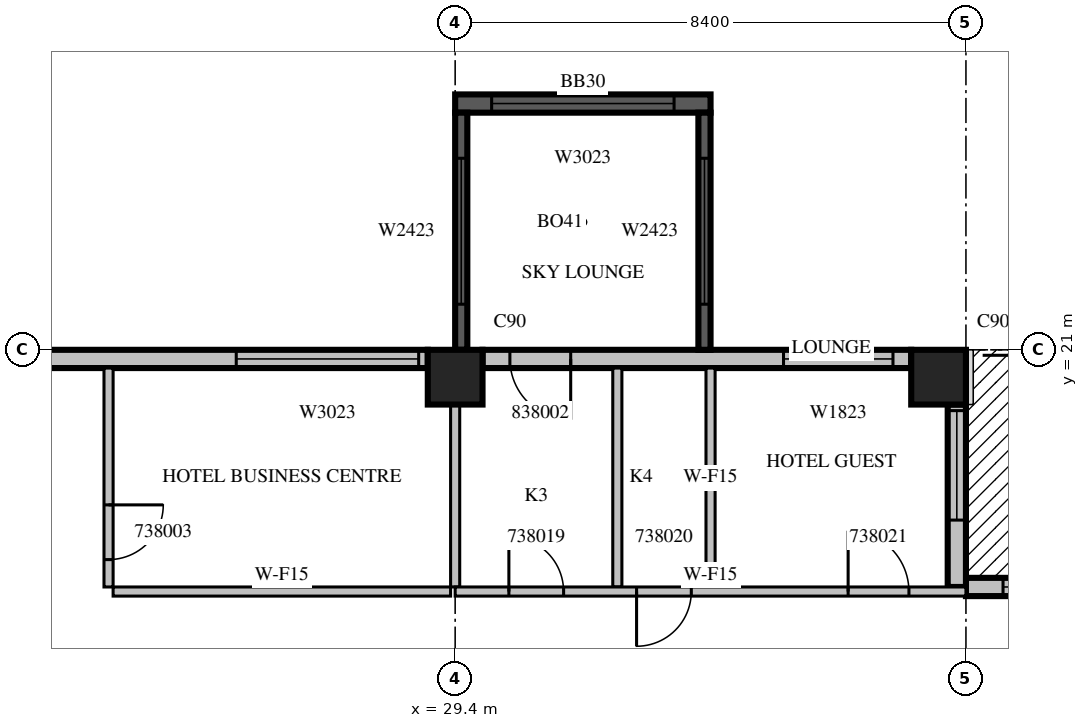
"""IFC4 building model, lengths in metres.
Left out: names, types, materials, properties, quantities, classifications, styles, units other than length and angle.
Written with IfcOpenShell. Run it as: python <this file> out.ifc"""

import sys

from ifc_helpers import new_model, si_unit, direction, frame, frame_2d, origin, origin_2d, place, context, subcontext, project, spatial, rectangle, extrude, source, transform, mapped, element, fill, save


model = new_model("IFC4")
c1 = context("Model", 3, precision=1e-05, world=origin(), true_north=direction((0.0, 1.0)))
c2 = subcontext(c1, "Body", "Model", "MODEL_VIEW")
j1 = project(units=[si_unit("LENGTHUNIT", "METRE"), si_unit("PLANEANGLEUNIT", "RADIAN")], contexts=[c1])
p1 = place(None, origin())
s1 = spatial("IfcSite", under=j1, at=p1, CompositionType="ELEMENT")
p2 = place(p1, origin())
s2 = spatial("IfcBuilding", under=s1, at=p2, CompositionType="ELEMENT")
p3 = place(p2, frame((0.0, 0.0, 177.8)))
s3 = spatial("IfcBuildingStorey", under=s2, at=p3, CompositionType="ELEMENT", Elevation=177.8)
m1 = source(origin(), c2, "Body", "SweptSolid", [
    extrude(rectangle(XDim=0.9, YDim=0.9, at=origin_2d()), origin(), (0.0, 0.0, 1.0), 3.8),
])
for number, where, z_axis, x_axis in (
    (1, (29.4, 20.55, 0.0), (0.0, 0.0, 1.0), (1.0, 0.0, 0.0)),
    (2, (37.35, 20.55, 0.0), (0.0, 0.0, 1.0), (1.0, 0.0, 0.0)),
):
    element("IfcColumn", number, at=place(p3, frame(where, z_axis=z_axis, x_axis=x_axis)), inside=s3, PredefinedType="COLUMN", context=c2, shape_type="MappedRepresentation", body=[
        mapped(m1, transform((0.0, 0.0, 0.0), scale=1.0)),
    ])
p4 = place(p3, frame((59.64, 17.1, 0.0), z_axis=(0.0, 0.0, 1.0), x_axis=(-1.0, 0.0, 0.0)))
e3 = element("IfcWall", 3, at=p4, inside=s3, PredefinedType="STANDARD", context=c2, shape_type="SweptSolid", body=[
    extrude(rectangle(XDim=21.84, YDim=0.3, at=frame_2d((10.92, 0.0))), origin(), (0.0, 0.0, 1.0), 3.4),
])
m2 = source(origin(), c2, "Body", "SweptSolid", [
    extrude(rectangle(XDim=1.8, YDim=2.4, at=frame_2d((0.9, 1.2))), frame((0.0, 0.16, 0.0), z_axis=(0.0, -1.0, 0.0), x_axis=(1.0, 0.0, 0.0)), (0.0, 0.0, 1.0), 0.32),
])
p5 = place(p4, frame((1.2, 0.0, 0.0)))
e4 = element("IfcOpeningElement", 4, at=p5, cuts=e3, PredefinedType="OPENING", context=c2, shape_type="MappedRepresentation", body=[
    mapped(m2, transform((0.0, 0.0, 0.0), scale=1.0)),
])
p6 = place(p4, frame((5.4, 0.0, 0.0)))
e5 = element("IfcOpeningElement", 5, at=p6, cuts=e3, PredefinedType="OPENING", context=c2, shape_type="MappedRepresentation", body=[
    mapped(m2, transform((0.0, 0.0, 0.0), scale=1.0)),
])
p7 = place(p4, frame((10.44, 0.0, 0.0)))
e6 = element("IfcOpeningElement", 6, at=p7, cuts=e3, PredefinedType="OPENING", context=c2, shape_type="MappedRepresentation", body=[
    mapped(m2, transform((0.0, 0.0, 0.0), scale=1.0)),
])
p8 = place(p4, frame((16.32, 0.0, 0.0)))
e7 = element("IfcOpeningElement", 7, at=p8, cuts=e3, PredefinedType="OPENING", context=c2, shape_type="MappedRepresentation", body=[
    mapped(m2, transform((0.0, 0.0, 0.0), scale=1.0)),
])
m3 = source(origin(), c2, "Body", "SweptSolid", [
    extrude(rectangle(XDim=1.8, YDim=2.3, at=frame_2d((0.9, 1.15))), frame((0.0, 0.16, 0.0), z_axis=(0.0, -1.0, 0.0), x_axis=(1.0, 0.0, 0.0)), (0.0, 0.0, 1.0), 0.32),
])
p9 = place(p4, frame((7.92, 0.0, 0.6)))
e8 = element("IfcOpeningElement", 8, at=p9, cuts=e3, PredefinedType="OPENING", context=c2, shape_type="MappedRepresentation", body=[
    mapped(m3, transform((0.0, 0.0, 0.0), scale=1.0)),
])
p10 = place(p4, frame((13.08, 0.0, 0.6)))
e9 = element("IfcOpeningElement", 9, at=p10, cuts=e3, PredefinedType="OPENING", context=c2, shape_type="SweptSolid", body=[
    extrude(rectangle(XDim=2.4, YDim=2.3, at=frame_2d((1.2, 1.15))), frame((0.0, 0.16, 0.0), z_axis=(0.0, -1.0, 0.0), x_axis=(1.0, 0.0, 0.0)), (0.0, 0.0, 1.0), 0.32),
])
m4 = source(origin(), c2, "Body", "SweptSolid", [
    extrude(rectangle(XDim=2.4, YDim=2.3, at=frame_2d((1.2, 1.15))), frame((0.0, 0.16, 0.0), z_axis=(0.0, -1.0, 0.0), x_axis=(1.0, 0.0, 0.0)), (0.0, 0.0, 1.0), 0.32),
])
p11 = place(p4, frame((18.83, 0.0, 0.6)))
e10 = element("IfcOpeningElement", 10, at=p11, cuts=e3, PredefinedType="OPENING", context=c2, shape_type="MappedRepresentation", body=[
    mapped(m4, transform((0.0, 0.0, 0.0), scale=1.0)),
])
p12 = place(p3, frame((37.65, 17.1, 0.0), z_axis=(0.0, 0.0, 1.0), x_axis=(0.0, 1.0, 0.0)))
e11 = element("IfcWall", 11, at=p12, inside=s3, PredefinedType="STANDARD", context=c2, shape_type="SweptSolid", body=[
    extrude(rectangle(XDim=3.0, YDim=0.3, at=frame_2d((1.5, 0.0))), origin(), (0.0, 0.0, 1.0), 3.4),
])
p13 = place(p12, frame((1.1, 0.0, 0.0)))
e12 = element("IfcOpeningElement", 12, at=p13, cuts=e11, PredefinedType="OPENING", context=c2, shape_type="MappedRepresentation", body=[
    mapped(m2, transform((0.0, 0.0, 0.0), scale=1.0)),
])
p14 = place(p3, frame((36.9, 20.85, 0.0), z_axis=(0.0, 0.0, 1.0), x_axis=(-1.0, 0.0, 0.0)))
e13 = element("IfcWall", 13, at=p14, inside=s3, PredefinedType="STANDARD", context=c2, shape_type="SweptSolid", body=[
    extrude(rectangle(XDim=7.05, YDim=0.3, at=frame_2d((3.525, 0.0))), origin(), (0.0, 0.0, 1.0), 3.4),
])
p15 = place(p14, frame((0.3, 0.0, 0.6)))
e14 = element("IfcOpeningElement", 14, at=p15, cuts=e13, PredefinedType="OPENING", context=c2, shape_type="MappedRepresentation", body=[
    mapped(m3, transform((0.0, 0.0, 0.0), scale=1.0)),
])
m5 = source(origin(), c2, "Body", "SweptSolid", [
    extrude(rectangle(XDim=1.0, YDim=2.1, at=frame_2d((0.5, 1.05))), frame((0.0, 0.16, 0.0), z_axis=(0.0, -1.0, 0.0), x_axis=(1.0, 0.0, 0.0)), (0.0, 0.0, 1.0), 0.32),
])
p16 = place(p14, frame((5.6, 0.0, 0.0)))
e15 = element("IfcOpeningElement", 15, at=p16, cuts=e13, PredefinedType="OPENING", context=c2, shape_type="MappedRepresentation", body=[
    mapped(m5, transform((0.0, 0.0, 0.0), scale=1.0)),
])
p17 = place(p3, frame((28.95, 20.85, 0.0), z_axis=(0.0, 0.0, 1.0), x_axis=(-1.0, 0.0, 0.0)))
e16 = element("IfcWall", 16, at=p17, inside=s3, PredefinedType="STANDARD", context=c2, shape_type="SweptSolid", body=[
    extrude(rectangle(XDim=7.15, YDim=0.3, at=frame_2d((3.575, 0.0))), origin(), (0.0, 0.0, 1.0), 3.4),
])
m6 = source(origin(), c2, "Body", "SweptSolid", [
    extrude(rectangle(XDim=3.0, YDim=2.3, at=frame_2d((1.5, 1.15))), frame((0.0, 0.16, 0.0), z_axis=(0.0, -1.0, 0.0), x_axis=(1.0, 0.0, 0.0)), (0.0, 0.0, 1.0), 0.32),
])
p18 = place(p17, frame((0.15, 0.0, 0.6)))
e17 = element("IfcOpeningElement", 17, at=p18, cuts=e16, PredefinedType="OPENING", context=c2, shape_type="MappedRepresentation", body=[
    mapped(m6, transform((0.0, 0.0, 0.0), scale=1.0)),
])
p19 = place(p3, frame((33.6, 25.05, 0.0), z_axis=(0.0, 0.0, 1.0), x_axis=(-1.0, 0.0, 0.0)))
e18 = element("IfcWall", 18, at=p19, inside=s3, PredefinedType="SOLIDWALL", context=c2, shape_type="SweptSolid", body=[
    extrude(rectangle(XDim=4.2, YDim=0.3, at=frame_2d((2.1, 0.0))), origin(), (0.0, 0.0, 1.0), 3.39),
])
p20 = place(p19, frame((0.6, 0.0, 0.6)))
e19 = element("IfcOpeningElement", 19, at=p20, cuts=e18, PredefinedType="OPENING", context=c2, shape_type="MappedRepresentation", body=[
    mapped(m6, transform((0.0, 0.0, 0.0), scale=1.0)),
])
m7 = source(origin(), c2, "Body", "SweptSolid", [
    extrude(rectangle(XDim=3.9, YDim=0.2, at=frame_2d((1.95, 0.0))), origin(), (0.0, 0.0, 1.0), 3.39),
])
p21 = place(p3, frame((33.5, 21.0, 0.0), z_axis=(0.0, 0.0, 1.0), x_axis=(0.0, 1.0, 0.0)))
e20 = element("IfcWall", 20, at=p21, inside=s3, PredefinedType="SOLIDWALL", context=c2, shape_type="MappedRepresentation", body=[
    mapped(m7, transform((0.0, 0.0, 0.0), scale=1.0)),
])
m8 = source(origin(), c2, "Body", "SweptSolid", [
    extrude(rectangle(XDim=2.4, YDim=2.3, at=frame_2d((1.2, 1.15))), frame((0.0, 0.11, 0.0), z_axis=(0.0, -1.0, 0.0), x_axis=(1.0, 0.0, 0.0)), (0.0, 0.0, 1.0), 0.22),
])
p22 = place(p21, frame((0.75, 0.0, 0.6)))
e21 = element("IfcOpeningElement", 21, at=p22, cuts=e20, PredefinedType="OPENING", context=c2, shape_type="MappedRepresentation", body=[
    mapped(m8, transform((0.0, 0.0, 0.0), scale=1.0)),
])
p23 = place(p3, frame((29.5, 21.0, 0.0), z_axis=(0.0, 0.0, 1.0), x_axis=(0.0, 1.0, 0.0)))
e22 = element("IfcWall", 22, at=p23, inside=s3, PredefinedType="SOLIDWALL", context=c2, shape_type="MappedRepresentation", body=[
    mapped(m7, transform((0.0, 0.0, 0.0), scale=1.0)),
])
p24 = place(p23, frame((0.75, 0.0, 0.6)))
e23 = element("IfcOpeningElement", 23, at=p24, cuts=e22, PredefinedType="OPENING", context=c2, shape_type="MappedRepresentation", body=[
    mapped(m8, transform((0.0, 0.0, 0.0), scale=1.0)),
])
p25 = place(p3, frame((23.7, 20.7, 0.0), z_axis=(0.0, 0.0, 1.0), x_axis=(0.0, -1.0, 0.0)))
e24 = element("IfcWall", 24, at=p25, inside=s3, PredefinedType="PARTITIONING", context=c2, shape_type="SweptSolid", body=[
    extrude(rectangle(XDim=3.6, YDim=0.15, at=frame_2d((1.8, 0.0))), origin(), (0.0, 0.0, 1.0), 3.4),
])
m9 = source(origin(), c2, "Body", "SweptSolid", [
    extrude(rectangle(XDim=0.9, YDim=2.1, at=frame_2d((0.45, 1.05))), frame((0.0, 0.085, 0.0), z_axis=(0.0, -1.0, 0.0), x_axis=(1.0, 0.0, 0.0)), (0.0, 0.0, 1.0), 0.17),
])
p26 = place(p25, frame((2.25, 0.0, 0.0)))
e25 = element("IfcOpeningElement", 25, at=p26, cuts=e24, PredefinedType="OPENING", context=c2, shape_type="MappedRepresentation", body=[
    mapped(m9, transform((0.0, 0.0, 0.0), scale=1.0)),
])
m10 = source(origin(), c2, "Body", "SweptSolid", [
    extrude(rectangle(XDim=5.55, YDim=0.15, at=frame_2d((2.775, 0.0))), origin(), (0.0, 0.0, 1.0), 3.4),
])
p27 = place(p3, frame((23.775, 17.025, 0.0), z_axis=(0.0, 0.0, 1.0), x_axis=(1.0, 0.0, 0.0)))
e26 = element("IfcWall", 26, at=p27, inside=s3, PredefinedType="PARTITIONING", context=c2, shape_type="MappedRepresentation", body=[
    mapped(m10, transform((0.0, 0.0, 0.0), scale=1.0)),
])
p28 = place(p3, frame((29.4, 17.1, 0.0), z_axis=(0.0, 0.0, 1.0), x_axis=(0.0, 1.0, 0.0)))
e27 = element("IfcWall", 27, at=p28, inside=s3, PredefinedType="PARTITIONING", context=c2, shape_type="SweptSolid", body=[
    extrude(rectangle(XDim=3.001, YDim=0.15, at=frame_2d((1.5, 0.0))), origin(), (0.0, 0.0, 1.0), 3.4),
])
m11 = source(origin(), c2, "Body", "SweptSolid", [
    extrude(rectangle(XDim=3.6, YDim=0.15, at=frame_2d((1.8, 0.0))), origin(), (0.0, 0.0, 1.0), 3.4),
])
for number, where, z_axis, x_axis in (
    (28, (32.067, 20.7, 0.0), (0.0, 0.0, 1.0), (0.0, -1.0, 0.0)),
    (29, (33.6, 17.1, 0.0), (0.0, 0.0, 1.0), (0.0, 1.0, 0.0)),
):
    element("IfcWall", number, at=place(p3, frame(where, z_axis=z_axis, x_axis=x_axis)), inside=s3, PredefinedType="PARTITIONING", context=c2, shape_type="MappedRepresentation", body=[
        mapped(m11, transform((0.0, 0.0, 0.0), scale=1.0)),
    ])
m12 = source(origin(), c2, "Body", "SweptSolid", [
    extrude(rectangle(XDim=8.4, YDim=0.15, at=frame_2d((4.2, 0.0))), origin(), (0.0, 0.0, 1.0), 3.4),
])
p29 = place(p3, frame((29.4, 17.025, 0.0), z_axis=(0.0, 0.0, 1.0), x_axis=(1.0, 0.0, 0.0)))
e30 = element("IfcWall", 30, at=p29, inside=s3, PredefinedType="PARTITIONING", context=c2, shape_type="MappedRepresentation", body=[
    mapped(m12, transform((0.0, 0.0, 0.0), scale=1.0)),
])
p30 = place(p29, frame((0.883, 0.0, 0.0)))
e31 = element("IfcOpeningElement", 31, at=p30, cuts=e30, PredefinedType="OPENING", context=c2, shape_type="MappedRepresentation", body=[
    mapped(m9, transform((0.0, 0.0, 0.0), scale=1.0)),
])
p31 = place(p29, frame((2.983, 0.0, 0.0)))
e32 = element("IfcOpeningElement", 32, at=p31, cuts=e30, PredefinedType="OPENING", context=c2, shape_type="MappedRepresentation", body=[
    mapped(m9, transform((0.0, 0.0, 0.0), scale=1.0)),
])
m13 = source(origin(), c2, "Body", "SweptSolid", [
    extrude(rectangle(XDim=1.0, YDim=2.1, at=frame_2d((0.5, 1.05))), frame((0.0, 0.085, 0.0), z_axis=(0.0, -1.0, 0.0), x_axis=(1.0, 0.0, 0.0)), (0.0, 0.0, 1.0), 0.17),
])
p32 = place(p29, frame((6.463, 0.0, 0.0)))
e33 = element("IfcOpeningElement", 33, at=p32, cuts=e30, PredefinedType="OPENING", context=c2, shape_type="MappedRepresentation", body=[
    mapped(m13, transform((0.0, 0.0, 0.0), scale=1.0)),
])
m14 = source(origin(), c2, "Body", "SweptSolid", [
    extrude(rectangle(XDim=2.4, YDim=2.3, at=frame_2d((1.2, 1.15))), frame((0.0, 0.03, 0.0), z_axis=(0.0, -1.0, 0.0), x_axis=(1.0, 0.0, 0.0)), (0.0, 0.0, 1.0), 0.06),
])
p33 = place(p11, origin())
e34 = element("IfcWindow", 34, at=p33, inside=s3, PartitioningType="SINGLE_PANEL", PredefinedType="WINDOW", context=c2, shape_type="MappedRepresentation", body=[
    mapped(m14, transform((0.0, 0.0, 0.0), scale=1.0)),
])
fill(e10, e34)
m15 = source(origin(), c2, "Body", "SweptSolid", [
    extrude(rectangle(XDim=1.8, YDim=2.4, at=frame_2d((0.9, 1.2))), frame((0.0, 0.025, 0.0), z_axis=(0.0, -1.0, 0.0), x_axis=(1.0, 0.0, 0.0)), (0.0, 0.0, 1.0), 0.05),
])
p34 = place(p13, origin())
e35 = element("IfcDoor", 35, at=p34, inside=s3, OperationType="SLIDING_TO_LEFT", PredefinedType="DOOR", context=c2, shape_type="MappedRepresentation", body=[
    mapped(m15, transform((0.0, 0.0, 0.0), scale=1.0)),
])
fill(e12, e35)
m16 = source(origin(), c2, "Body", "SweptSolid", [
    extrude(rectangle(XDim=1.8, YDim=2.3, at=frame_2d((0.9, 1.15))), frame((0.0, 0.03, 0.0), z_axis=(0.0, -1.0, 0.0), x_axis=(1.0, 0.0, 0.0)), (0.0, 0.0, 1.0), 0.06),
])
p35 = place(p15, origin())
e36 = element("IfcWindow", 36, at=p35, inside=s3, PartitioningType="SINGLE_PANEL", PredefinedType="WINDOW", context=c2, shape_type="MappedRepresentation", body=[
    mapped(m16, transform((0.0, 0.0, 0.0), scale=1.0)),
])
fill(e14, e36)
m17 = source(origin(), c2, "Body", "SweptSolid", [
    extrude(rectangle(XDim=3.0, YDim=2.3, at=frame_2d((1.5, 1.15))), frame((0.0, 0.03, 0.0), z_axis=(0.0, -1.0, 0.0), x_axis=(1.0, 0.0, 0.0)), (0.0, 0.0, 1.0), 0.06),
])
p36 = place(p18, origin())
e37 = element("IfcWindow", 37, at=p36, inside=s3, PartitioningType="SINGLE_PANEL", PredefinedType="WINDOW", context=c2, shape_type="MappedRepresentation", body=[
    mapped(m17, transform((0.0, 0.0, 0.0), scale=1.0)),
])
fill(e17, e37)
p37 = place(p20, origin())
e38 = element("IfcWindow", 38, at=p37, inside=s3, PartitioningType="SINGLE_PANEL", PredefinedType="WINDOW", context=c2, shape_type="MappedRepresentation", body=[
    mapped(m17, transform((0.0, 0.0, 0.0), scale=1.0)),
])
fill(e19, e38)
p38 = place(p22, origin())
e39 = element("IfcWindow", 39, at=p38, inside=s3, PartitioningType="SINGLE_PANEL", PredefinedType="WINDOW", context=c2, shape_type="MappedRepresentation", body=[
    mapped(m14, transform((0.0, 0.0, 0.0), scale=1.0)),
])
fill(e21, e39)
p39 = place(p24, origin())
e40 = element("IfcWindow", 40, at=p39, inside=s3, PartitioningType="SINGLE_PANEL", PredefinedType="WINDOW", context=c2, shape_type="MappedRepresentation", body=[
    mapped(m14, transform((0.0, 0.0, 0.0), scale=1.0)),
])
fill(e23, e40)
m18 = source(origin(), c2, "Body", "SweptSolid", [
    extrude(rectangle(XDim=0.9, YDim=2.1, at=frame_2d((0.45, 1.05))), frame((0.0, 0.025, 0.0), z_axis=(0.0, -1.0, 0.0), x_axis=(1.0, 0.0, 0.0)), (0.0, 0.0, 1.0), 0.05),
])
p40 = place(p26, origin())
e41 = element("IfcDoor", 41, at=p40, inside=s3, OperationType="SINGLE_SWING_LEFT", PredefinedType="DOOR", context=c2, shape_type="MappedRepresentation", body=[
    mapped(m18, transform((0.0, 0.0, 0.0), scale=1.0)),
])
fill(e25, e41)
p41 = place(p30, origin())
e42 = element("IfcDoor", 42, at=p41, inside=s3, OperationType="SINGLE_SWING_LEFT", PredefinedType="DOOR", context=c2, shape_type="MappedRepresentation", body=[
    mapped(m18, transform((0.0, 0.0, 0.0), scale=1.0)),
])
fill(e31, e42)
p42 = place(p31, origin())
e43 = element("IfcDoor", 43, at=p42, inside=s3, OperationType="SINGLE_SWING_RIGHT", PredefinedType="DOOR", context=c2, shape_type="MappedRepresentation", body=[
    mapped(m18, transform((0.0, 0.0, 0.0), scale=1.0)),
])
fill(e32, e43)
m19 = source(origin(), c2, "Body", "SweptSolid", [
    extrude(rectangle(XDim=1.0, YDim=2.1, at=frame_2d((0.5, 1.05))), frame((0.0, 0.025, 0.0), z_axis=(0.0, -1.0, 0.0), x_axis=(1.0, 0.0, 0.0)), (0.0, 0.0, 1.0), 0.05),
])
p43 = place(p32, origin())
e44 = element("IfcDoor", 44, at=p43, inside=s3, OperationType="SINGLE_SWING_LEFT", PredefinedType="DOOR", context=c2, shape_type="MappedRepresentation", body=[
    mapped(m19, transform((0.0, 0.0, 0.0), scale=1.0)),
])
fill(e33, e44)
p44 = place(p16, origin())
e45 = element("IfcDoor", 45, at=p44, inside=s3, OperationType="SINGLE_SWING_LEFT", PredefinedType="DOOR", context=c2, shape_type="MappedRepresentation", body=[
    mapped(m19, transform((0.0, 0.0, 0.0), scale=1.0)),
])
fill(e15, e45)
save(model, sys.argv[1])
